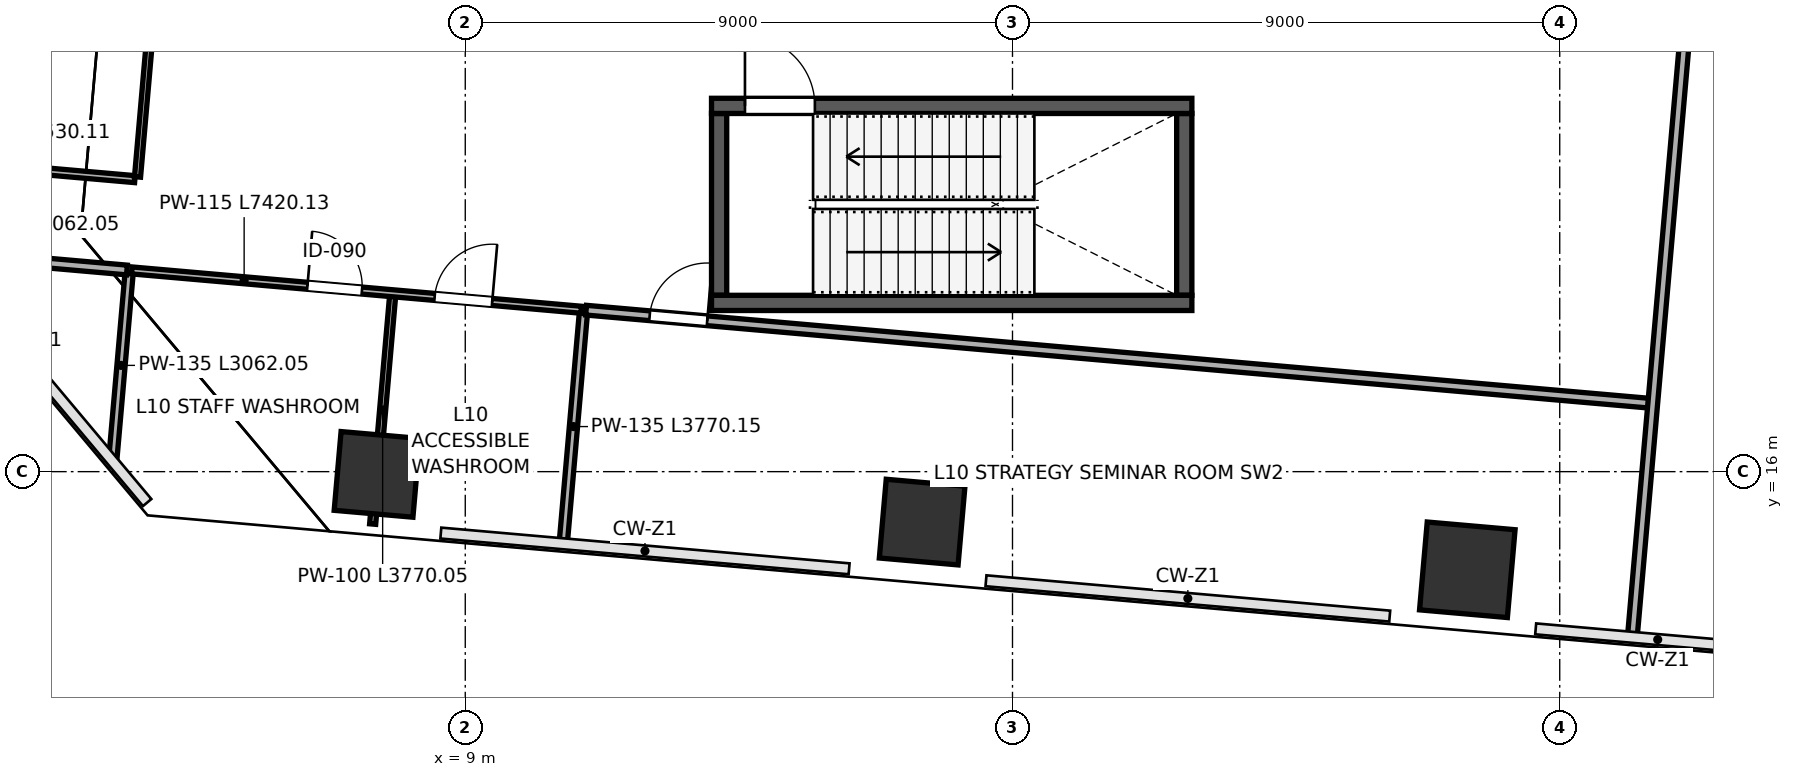
"""IFC4 building model, lengths in metres.
Left out: names, types, materials, properties, quantities, classifications, styles, units other than length and angle.
Written with IfcOpenShell. Run it as: python <this file> out.ifc"""

import sys

from ifc_helpers import new_model, si_unit, direction, frame, frame_2d, origin, origin_2d, place, context, subcontext, project, spatial, rectangle, extrude, source, transform, mapped, element, fill, save


model = new_model("IFC4")
c1 = context("Model", 3, precision=1e-05, world=origin(), true_north=direction((0.0, 1.0)))
c2 = subcontext(c1, "Body", "Model", "MODEL_VIEW")
j1 = project(units=[si_unit("LENGTHUNIT", "METRE"), si_unit("PLANEANGLEUNIT", "RADIAN")], contexts=[c1])
p1 = place(None, origin())
s1 = spatial("IfcSite", under=j1, at=p1, CompositionType="ELEMENT")
p2 = place(p1, origin())
s2 = spatial("IfcBuilding", under=s1, at=p2, CompositionType="ELEMENT")
p3 = place(p2, frame((0.0, 0.0, 47.2)))
s3 = spatial("IfcBuildingStorey", under=s2, at=p3, CompositionType="ELEMENT", Elevation=47.2)
m1 = source(origin(), c2, "Body", "SweptSolid", [
    extrude(rectangle(XDim=1.3, YDim=1.3, at=origin_2d()), origin(), (0.0, 0.0, 1.0), 4.799),
])
for number, where, z_axis, x_axis in (
    (1, (7.549, 15.955, 0.001), (0.0, 0.0, 1.0), (-0.996, 0.087, 0.0)),
    (2, (16.514, 15.17, 0.001), (0.0, 0.0, 1.0), (-0.996, 0.087, 0.0)),
):
    element("IfcColumn", number, at=place(p3, frame(where, z_axis=z_axis, x_axis=x_axis)), inside=s3, PredefinedType="COLUMN", context=c2, shape_type="MappedRepresentation", body=[
        mapped(m1, transform((0.0, 0.0, 0.0), scale=1.0)),
    ])
m2 = source(origin(), c2, "Body", "SweptSolid", [
    extrude(rectangle(XDim=1.45, YDim=1.45, at=origin_2d()), origin(), (0.0, 0.0, 1.0), 4.799),
])
p4 = place(p3, frame((25.48, 14.386, 0.001), z_axis=(0.0, 0.0, 1.0), x_axis=(-0.996194698092, 0.087155742748, 0.0)))
e3 = element("IfcColumn", 3, at=p4, inside=s3, PredefinedType="COLUMN", context=c2, shape_type="MappedRepresentation", body=[
    mapped(m2, transform((0.0, 0.0, 0.0), scale=1.0)),
])
for number, where, z_axis, x_axis in (
    (4, (13.175, 18.9, 0.0), (0.0, 0.0, 1.0), (0.0, 1.0, 0.0)),
    (5, (20.825, 18.9, 0.0), (0.0, 0.0, 1.0), (0.0, 1.0, 0.0)),
):
    element("IfcWall", number, at=place(p3, frame(where, z_axis=z_axis, x_axis=x_axis)), inside=s3, PredefinedType="SHEAR", context=c2, shape_type="SweptSolid", body=[
        extrude(rectangle(XDim=2.99, YDim=0.25, at=frame_2d((1.495, 0.0))), origin(), (0.0, 0.0, 1.0), 4.56),
    ])
p5 = place(p3, frame((13.05, 18.775, 0.0), z_axis=(0.0, 0.0, 1.0), x_axis=(1.0, 0.0, 0.0)))
e6 = element("IfcWall", 6, at=p5, inside=s3, PredefinedType="SHEAR", context=c2, shape_type="SweptSolid", body=[
    extrude(rectangle(XDim=7.9, YDim=0.25, at=frame_2d((3.95, 0.0))), origin(), (0.0, 0.0, 1.0), 4.56),
])
p6 = place(p3, frame((13.05, 22.015, 0.0), z_axis=(0.0, 0.0, 1.0), x_axis=(1.0, 0.0, 0.0)))
e7 = element("IfcWall", 7, at=p6, inside=s3, PredefinedType="SHEAR", context=c2, shape_type="SweptSolid", body=[
    extrude(rectangle(XDim=7.9, YDim=0.25, at=frame_2d((3.95, 0.0))), origin(), (0.0, 0.0, 1.0), 4.56),
])
p7 = place(p6, frame((0.55, 0.0, 0.0)))
e8 = element("IfcOpeningElement", 8, at=p7, cuts=e7, PredefinedType="OPENING", context=c2, shape_type="SweptSolid", body=[
    extrude(rectangle(XDim=1.15, YDim=2.2, at=frame_2d((0.575, 1.1))), frame((0.0, 0.135, 0.0), z_axis=(0.0, -1.0, 0.0), x_axis=(1.0, 0.0, 0.0)), (0.0, 0.0, 1.0), 0.27),
])
p8 = place(p3, frame((3.205, 16.222, 0.0), z_axis=(0.0, 0.0, 1.0), x_axis=(0.087149146451, 0.996195275171, 0.0)))
e9 = element("IfcWall", 9, at=p8, inside=s3, PredefinedType="PARTITIONING", context=c2, shape_type="SweptSolid", body=[
    extrude(rectangle(XDim=3.062, YDim=0.135, at=frame_2d((1.531, 0.0))), origin(), (0.0, 0.0, 1.0), 4.56),
])
p9 = place(p3, frame((0.385, 19.583, 0.0), z_axis=(0.0, 0.0, 1.0), x_axis=(0.996195275171, -0.087149146451, 0.0)))
e10 = element("IfcWall", 10, at=p9, inside=s3, PredefinedType="PARTITIONING", context=c2, shape_type="SweptSolid", body=[
    extrude(rectangle(XDim=3.062, YDim=0.16, at=frame_2d((1.531, 0.0))), origin(), (0.0, 0.0, 1.0), 4.56),
])
p10 = place(p3, frame((7.477, 15.138, 0.0), z_axis=(0.0, 0.0, 1.0), x_axis=(0.087160523959, 0.996194279778, 0.0)))
e11 = element("IfcWall", 11, at=p10, inside=s3, PredefinedType="PARTITIONING", context=c2, shape_type="SweptSolid", body=[
    extrude(rectangle(XDim=3.77, YDim=0.1, at=frame_2d((1.885, 0.0))), origin(), (0.0, 0.0, 1.0), 3.695),
])
p11 = place(p3, frame((10.615, 14.863, 0.0), z_axis=(0.0, 0.0, 1.0), x_axis=(0.087160523959, 0.996194279778, 0.0)))
e12 = element("IfcWall", 12, at=p11, inside=s3, PredefinedType="PARTITIONING", context=c2, shape_type="SweptSolid", body=[
    extrude(rectangle(XDim=3.77, YDim=0.135, at=frame_2d((1.885, 0.0))), origin(), (0.0, 0.0, 1.0), 3.695),
])
p12 = place(p3, frame((3.515, 19.309, 0.0), z_axis=(0.0, 0.0, 1.0), x_axis=(0.99619725236, -0.0871265424, 0.0)))
e13 = element("IfcWall", 13, at=p12, inside=s3, PredefinedType="PARTITIONING", context=c2, shape_type="SweptSolid", body=[
    extrude(rectangle(XDim=7.42, YDim=0.115, at=frame_2d((3.71, 0.0))), origin(), (0.0, 0.0, 1.0), 4.56),
])
p13 = place(p12, frame((2.9, 0.0, 0.0)))
e14 = element("IfcOpeningElement", 14, at=p13, cuts=e13, PredefinedType="OPENING", context=c2, shape_type="SweptSolid", body=[
    extrude(rectangle(XDim=0.9, YDim=2.15, at=frame_2d((0.45, 1.075))), frame((0.0, 0.067, 0.0), z_axis=(0.0, -1.0, 0.0), x_axis=(1.0, 0.0, 0.0)), (0.0, 0.0, 1.0), 0.135),
])
p14 = place(p12, frame((5.0, 0.0, 0.0)))
e15 = element("IfcOpeningElement", 15, at=p14, cuts=e13, PredefinedType="OPENING", context=c2, shape_type="SweptSolid", body=[
    extrude(rectangle(XDim=0.95, YDim=2.15, at=frame_2d((0.475, 1.075))), frame((0.0, 0.067, 0.0), z_axis=(0.0, -1.0, 0.0), x_axis=(1.0, 0.0, 0.0)), (0.0, 0.0, 1.0), 0.135),
])
p15 = place(p3, frame((10.987, 18.656, 0.0), z_axis=(0.0, 0.0, 1.0), x_axis=(0.99619508988, -0.087151264471, 0.0)))
e16 = element("IfcWall", 16, at=p15, inside=s3, PredefinedType="PARTITIONING", context=c2, shape_type="SweptSolid", body=[
    extrude(rectangle(XDim=17.57, YDim=0.16, at=frame_2d((8.785, 0.0))), origin(), (0.0, 0.0, 1.0), 4.56),
])
p16 = place(p15, frame((1.05, 0.0, 0.0)))
e17 = element("IfcOpeningElement", 17, at=p16, cuts=e16, PredefinedType="OPENING", context=c2, shape_type="SweptSolid", body=[
    extrude(rectangle(XDim=0.95, YDim=2.15, at=frame_2d((0.475, 1.075))), frame((0.0, 0.09, 0.0), z_axis=(0.0, -1.0, 0.0), x_axis=(1.0, 0.0, 0.0)), (0.0, 0.0, 1.0), 0.18),
])
p17 = place(p3, frame((-0.05, 21.127, 0.0), z_axis=(0.0, 0.0, 1.0), x_axis=(0.996194520424, -0.087157773474, 0.0)))
e18 = element("IfcWall", 18, at=p17, inside=s3, PredefinedType="PARTITIONING", context=c2, shape_type="SweptSolid", body=[
    extrude(rectangle(XDim=3.63, YDim=0.115, at=frame_2d((1.815, 0.0))), origin(), (0.0, 0.0, 1.0), 4.56),
])
p18 = place(p3, frame((3.61, 20.847, 0.0), z_axis=(0.0, 0.0, 1.0), x_axis=(0.087153664928, 0.996194879875, 0.0)))
e19 = element("IfcWall", 19, at=p18, inside=s3, PredefinedType="PARTITIONING", context=c2, shape_type="SweptSolid", body=[
    extrude(rectangle(XDim=23.48, YDim=0.1, at=frame_2d((11.74, 0.0))), origin(), (0.0, 0.0, 1.0), 3.395),
])
p19 = place(p18, frame((7.0, 0.0, 0.0)))
e20 = element("IfcOpeningElement", 20, at=p19, cuts=e19, PredefinedType="OPENING", context=c2, shape_type="SweptSolid", body=[
    extrude(rectangle(XDim=0.95, YDim=2.15, at=frame_2d((0.475, 1.075))), frame((0.0, 0.06, 0.0), z_axis=(0.0, -1.0, 0.0), x_axis=(1.0, 0.0, 0.0)), (0.0, 0.0, 1.0), 0.12),
])
p20 = place(p3, frame((28.198, 13.325, 0.0), z_axis=(0.0, 0.0, 1.0), x_axis=(0.087154794008, 0.996194781095, 0.0)))
e21 = element("IfcWall", 21, at=p20, inside=s3, PredefinedType="PARTITIONING", context=c2, shape_type="SweptSolid", body=[
    extrude(rectangle(XDim=20.18, YDim=0.16, at=frame_2d((10.09, 0.0))), origin(), (0.0, 0.0, 1.0), 4.56),
])
m3 = source(origin(), c2, "Body", "SweptSolid", [
    extrude(rectangle(XDim=1.15, YDim=2.2, at=frame_2d((0.575, 1.1))), frame((0.0, 0.025, 0.0), z_axis=(0.0, -1.0, 0.0), x_axis=(1.0, 0.0, 0.0)), (0.0, 0.0, 1.0), 0.05),
])
p21 = place(p7, origin())
e22 = element("IfcDoor", 22, at=p21, inside=s3, OperationType="SINGLE_SWING_LEFT", PredefinedType="DOOR", context=c2, shape_type="MappedRepresentation", body=[
    mapped(m3, transform((0.0, 0.0, 0.0), scale=1.0)),
])
fill(e8, e22)
m4 = source(origin(), c2, "Body", "SweptSolid", [
    extrude(rectangle(XDim=0.9, YDim=2.15, at=frame_2d((0.45, 1.075))), frame((0.0, 0.025, 0.0), z_axis=(0.0, -1.0, 0.0), x_axis=(1.0, 0.0, 0.0)), (0.0, 0.0, 1.0), 0.05),
])
p22 = place(p13, origin())
e23 = element("IfcDoor", 23, at=p22, inside=s3, OperationType="SINGLE_SWING_LEFT", PredefinedType="DOOR", context=c2, shape_type="MappedRepresentation", body=[
    mapped(m4, transform((0.0, 0.0, 0.0), scale=1.0)),
])
fill(e14, e23)
m5 = source(origin(), c2, "Body", "SweptSolid", [
    extrude(rectangle(XDim=0.95, YDim=2.15, at=frame_2d((0.475, 1.075))), frame((0.0, 0.025, 0.0), z_axis=(0.0, -1.0, 0.0), x_axis=(1.0, 0.0, 0.0)), (0.0, 0.0, 1.0), 0.05),
])
p23 = place(p14, origin())
e24 = element("IfcDoor", 24, at=p23, inside=s3, OperationType="SINGLE_SWING_RIGHT", PredefinedType="DOOR", context=c2, shape_type="MappedRepresentation", body=[
    mapped(m5, transform((0.0, 0.0, 0.0), scale=1.0)),
])
fill(e15, e24)
m6 = source(origin(), c2, "Body", "SweptSolid", [
    extrude(rectangle(XDim=0.95, YDim=2.15, at=frame_2d((0.475, 1.075))), frame((0.0, 0.025, 0.0), z_axis=(0.0, -1.0, 0.0), x_axis=(1.0, 0.0, 0.0)), (0.0, 0.0, 1.0), 0.05),
])
p24 = place(p16, origin())
e25 = element("IfcDoor", 25, at=p24, inside=s3, OperationType="SINGLE_SWING_RIGHT", PredefinedType="DOOR", context=c2, shape_type="MappedRepresentation", body=[
    mapped(m6, transform((0.0, 0.0, 0.0), scale=1.0)),
])
fill(e17, e25)
save(model, sys.argv[1])
